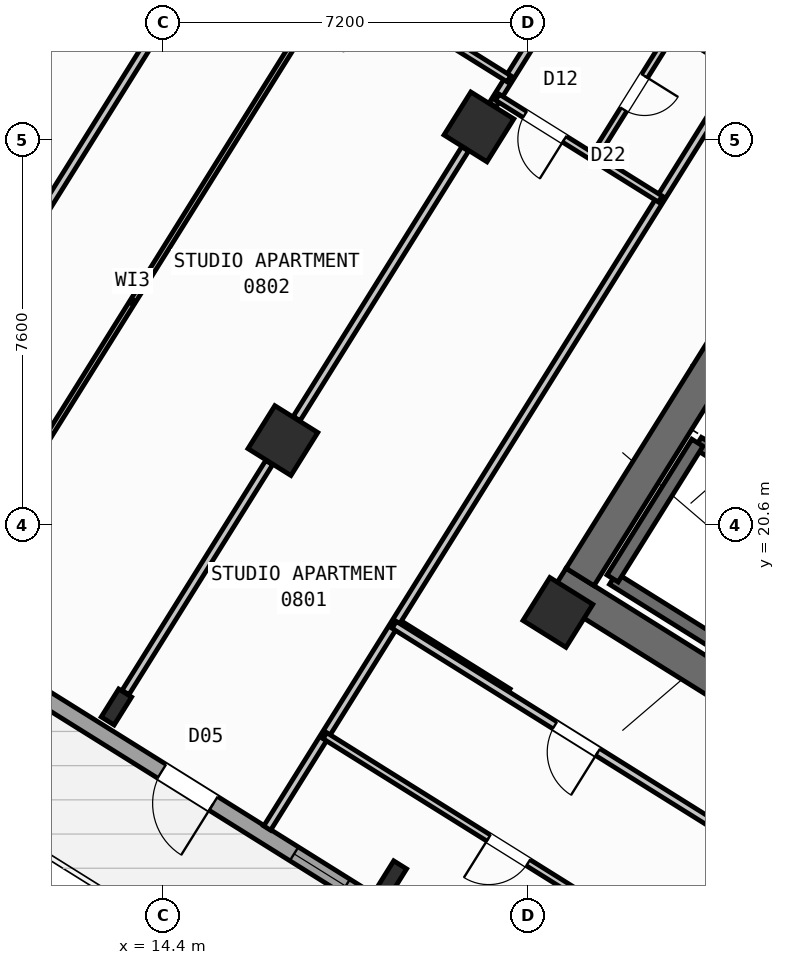
"""IFC4 building model, lengths in metres.
Left out: names, types, materials, properties, quantities, classifications, styles, units other than length and angle.
Written with IfcOpenShell. Run it as: python <this file> out.ifc"""

import sys

from ifc_helpers import new_model, si_unit, direction, frame, frame_2d, origin, origin_2d, place, context, subcontext, project, spatial, rectangle, hollow_rectangle, i_section, extrude, source, transform, mapped, element, fill, save


model = new_model("IFC4")
c1 = context("Model", 3, precision=1e-05, world=origin(), true_north=direction((0.0, 1.0)))
c2 = subcontext(c1, "Body", "Model", "MODEL_VIEW")
j1 = project(units=[si_unit("LENGTHUNIT", "METRE"), si_unit("PLANEANGLEUNIT", "RADIAN")], contexts=[c1])
p1 = place(None, origin())
s1 = spatial("IfcSite", under=j1, at=p1, CompositionType="ELEMENT")
p2 = place(p1, origin())
s2 = spatial("IfcBuilding", under=s1, at=p2, CompositionType="ELEMENT")
p3 = place(p2, frame((0.0, 0.0, 34.8)))
s3 = spatial("IfcBuildingStorey", under=s2, at=p3, CompositionType="ELEMENT", Elevation=34.8)
p4 = place(p3, frame((33.409, 12.45, 0.0), z_axis=(0.0, 0.0, 1.0), x_axis=(-0.848051132073, 0.529914405721, 0.0)))
e1 = element("IfcWall", 1, at=p4, inside=s3, PredefinedType="SHEAR", context=c2, shape_type="SweptSolid", body=[
    extrude(rectangle(XDim=13.24, YDim=0.65, at=frame_2d((6.62, 0.0))), origin(), (0.0, 0.0, 1.0), 3.35),
])
p5 = place(p3, frame((26.007, 24.976, 0.0), z_axis=(0.0, 0.0, 1.0), x_axis=(-0.529916319127, -0.848049936456, 0.0)))
e2 = element("IfcWall", 2, at=p5, inside=s3, PredefinedType="SHEAR", context=c2, shape_type="SweptSolid", body=[
    extrude(rectangle(XDim=6.375, YDim=0.65, at=frame_2d((3.188, 0.0))), origin(), (0.0, 0.0, 1.0), 3.35),
])
m1 = source(origin(), c2, "Body", "SweptSolid", [
    extrude(hollow_rectangle(XDim=1.0, YDim=1.0, WallThickness=0.04, at=origin_2d()), origin(), (0.0, 0.0, 1.0), 3.6),
])
p6 = place(p3, frame((22.191, 18.87, 0.0), z_axis=(0.0, 0.0, 1.0), x_axis=(-0.848048096156, 0.529919264233, 0.0)))
e3 = element("IfcColumn", 3, at=p6, inside=s3, PredefinedType="COLUMN", context=c2, shape_type="MappedRepresentation", body=[
    mapped(m1, transform((0.0, 0.0, 0.0), scale=1.0)),
])
m2 = source(origin(), c2, "Body", "SweptSolid", [
    extrude(i_section(OverallWidth=0.3, OverallDepth=0.65, WebThickness=0.016, FlangeThickness=0.031, at=origin_2d()), origin(), (0.0, 0.0, 1.0), 3.6),
])
p7 = place(p3, frame((18.906, 13.612, 0.0), z_axis=(0.0, 0.0, 1.0), x_axis=(-0.848048096156, 0.529919264233, 0.0)))
e4 = element("IfcColumn", 4, at=p7, inside=s3, PredefinedType="COLUMN", context=c2, shape_type="MappedRepresentation", body=[
    mapped(m2, transform((0.0, 0.0, 0.0), scale=1.0)),
])
for number, where, z_axis, x_axis in (
    (5, (20.632, 28.452, 0.0), (0.0, 0.0, 1.0), (-0.848, 0.53, 0.0)),
    (6, (16.764, 22.261, 0.0), (0.0, 0.0, 1.0), (-0.848, 0.53, 0.0)),
):
    element("IfcColumn", number, at=place(p3, frame(where, z_axis=z_axis, x_axis=x_axis)), inside=s3, PredefinedType="COLUMN", context=c2, shape_type="MappedRepresentation", body=[
        mapped(m1, transform((0.0, 0.0, 0.0), scale=1.0)),
    ])
p8 = place(p3, frame((13.478, 17.003, 0.0), z_axis=(0.0, 0.0, 1.0), x_axis=(-0.848048096156, 0.529919264233, 0.0)))
e7 = element("IfcColumn", 7, at=p8, inside=s3, PredefinedType="COLUMN", context=c2, shape_type="MappedRepresentation", body=[
    mapped(m2, transform((0.0, 0.0, 0.0), scale=1.0)),
])
p9 = place(p3, frame((29.268, 6.429, 0.0), z_axis=(0.0, 0.0, 1.0), x_axis=(-0.848049971435, 0.529916263149, 0.0)))
e8 = element("IfcWall", 8, at=p9, inside=s3, PredefinedType="STANDARD", context=c2, shape_type="SweptSolid", body=[
    extrude(rectangle(XDim=31.588, YDim=0.32, at=frame_2d((15.794, 0.0))), origin(), (0.0, 0.0, 1.0), 3.35),
])
p10 = place(p9, frame((16.362, 0.0, 0.0)))
e9 = element("IfcOpeningElement", 9, at=p10, cuts=e8, PredefinedType="OPENING", context=c2, shape_type="SweptSolid", body=[
    extrude(rectangle(XDim=1.2, YDim=2.15, at=frame_2d((0.6, 1.075))), frame((0.0, 0.17, 0.0), z_axis=(0.0, -1.0, 0.0), x_axis=(1.0, 0.0, 0.0)), (0.0, 0.0, 1.0), 0.34),
])
p11 = place(p9, frame((2.989, 0.0, 0.8)))
e10 = element("IfcOpeningElement", 10, at=p11, cuts=e8, PredefinedType="OPENING", context=c2, shape_type="SweptSolid", body=[
    extrude(rectangle(XDim=2.1, YDim=1.55, at=frame_2d((1.05, 0.775))), frame((0.0, 0.17, 0.0), z_axis=(0.0, -1.0, 0.0), x_axis=(1.0, 0.0, 0.0)), (0.0, 0.0, 1.0), 0.34),
])
p12 = place(p9, frame((8.359, 0.0, 0.8)))
e11 = element("IfcOpeningElement", 11, at=p12, cuts=e8, PredefinedType="OPENING", context=c2, shape_type="SweptSolid", body=[
    extrude(rectangle(XDim=2.1, YDim=1.55, at=frame_2d((1.05, 0.775))), frame((0.0, 0.17, 0.0), z_axis=(0.0, -1.0, 0.0), x_axis=(1.0, 0.0, 0.0)), (0.0, 0.0, 1.0), 0.34),
])
p13 = place(p9, frame((13.284, 0.0, 0.95)))
e12 = element("IfcOpeningElement", 12, at=p13, cuts=e8, PredefinedType="OPENING", context=c2, shape_type="SweptSolid", body=[
    extrude(rectangle(XDim=1.2, YDim=1.4, at=frame_2d((0.6, 0.7))), frame((0.0, 0.17, 0.0), z_axis=(0.0, -1.0, 0.0), x_axis=(1.0, 0.0, 0.0)), (0.0, 0.0, 1.0), 0.34),
])
p14 = place(p9, frame((20.39, 0.0, 0.95)))
e13 = element("IfcOpeningElement", 13, at=p14, cuts=e8, PredefinedType="OPENING", context=c2, shape_type="SweptSolid", body=[
    extrude(rectangle(XDim=1.2, YDim=1.4, at=frame_2d((0.6, 0.7))), frame((0.0, 0.17, 0.0), z_axis=(0.0, -1.0, 0.0), x_axis=(1.0, 0.0, 0.0)), (0.0, 0.0, 1.0), 0.34),
])
p15 = place(p9, frame((23.715, 0.0, 1.0)))
e14 = element("IfcOpeningElement", 14, at=p15, cuts=e8, PredefinedType="OPENING", context=c2, shape_type="SweptSolid", body=[
    extrude(rectangle(XDim=0.9, YDim=1.25, at=frame_2d((0.45, 0.625))), frame((0.0, 0.17, 0.0), z_axis=(0.0, -1.0, 0.0), x_axis=(1.0, 0.0, 0.0)), (0.0, 0.0, 1.0), 0.34),
])
p16 = place(p9, frame((27.481, 0.0, 0.8)))
e15 = element("IfcOpeningElement", 15, at=p16, cuts=e8, PredefinedType="OPENING", context=c2, shape_type="SweptSolid", body=[
    extrude(rectangle(XDim=2.1, YDim=1.55, at=frame_2d((1.05, 0.775))), frame((0.0, 0.17, 0.0), z_axis=(0.0, -1.0, 0.0), x_axis=(1.0, 0.0, 0.0)), (0.0, 0.0, 1.0), 0.34),
])
p17 = place(p3, frame((2.415, 23.452, 0.0), z_axis=(0.0, 0.0, 1.0), x_axis=(0.52991049553, 0.848053575387, 0.0)))
e16 = element("IfcWall", 16, at=p17, inside=s3, PredefinedType="STANDARD", context=c2, shape_type="SweptSolid", body=[
    extrude(rectangle(XDim=21.587, YDim=0.32, at=frame_2d((10.794, 0.0))), origin(), (0.0, 0.0, 1.0), 2.725),
])
p18 = place(p17, frame((2.356, 0.0, 0.8)))
e17 = element("IfcOpeningElement", 17, at=p18, cuts=e16, PredefinedType="OPENING", context=c2, shape_type="SweptSolid", body=[
    extrude(rectangle(XDim=2.1, YDim=1.55, at=frame_2d((1.05, 0.775))), frame((0.0, 0.17, 0.0), z_axis=(0.0, -1.0, 0.0), x_axis=(1.0, 0.0, 0.0)), (0.0, 0.0, 1.0), 0.34),
])
p19 = place(p17, frame((9.344, 0.0, 0.85)))
e18 = element("IfcOpeningElement", 18, at=p19, cuts=e16, PredefinedType="OPENING", context=c2, shape_type="SweptSolid", body=[
    extrude(rectangle(XDim=1.8, YDim=1.5, at=frame_2d((0.9, 0.75))), frame((0.0, 0.17, 0.0), z_axis=(0.0, -1.0, 0.0), x_axis=(1.0, 0.0, 0.0)), (0.0, 0.0, 1.0), 0.34),
])
p20 = place(p17, frame((15.154, 0.0, 0.85)))
e19 = element("IfcOpeningElement", 19, at=p20, cuts=e16, PredefinedType="OPENING", context=c2, shape_type="SweptSolid", body=[
    extrude(rectangle(XDim=1.5, YDim=1.5, at=frame_2d((0.75, 0.75))), frame((0.0, 0.17, 0.0), z_axis=(0.0, -1.0, 0.0), x_axis=(1.0, 0.0, 0.0)), (0.0, 0.0, 1.0), 0.34),
])
p21 = place(p3, frame((14.138, 41.825, 0.0), z_axis=(0.0, 0.0, 1.0), x_axis=(0.848046498049, -0.529921821731, 0.0)))
e20 = element("IfcWall", 20, at=p21, inside=s3, PredefinedType="STANDARD", context=c2, shape_type="SweptSolid", body=[
    extrude(rectangle(XDim=31.588, YDim=0.32, at=frame_2d((15.794, 0.0))), origin(), (0.0, 0.0, 1.0), 3.35),
])
p22 = place(p21, frame((3.369, 0.0, 0.0)))
e21 = element("IfcOpeningElement", 21, at=p22, cuts=e20, PredefinedType="OPENING", context=c2, shape_type="SweptSolid", body=[
    extrude(rectangle(XDim=1.05, YDim=2.15, at=frame_2d((0.525, 1.075))), frame((0.0, 0.17, 0.0), z_axis=(0.0, -1.0, 0.0), x_axis=(1.0, 0.0, 0.0)), (0.0, 0.0, 1.0), 0.34),
])
p23 = place(p21, frame((0.946, 0.0, 0.85)))
e22 = element("IfcOpeningElement", 22, at=p23, cuts=e20, PredefinedType="OPENING", context=c2, shape_type="SweptSolid", body=[
    extrude(rectangle(XDim=1.8, YDim=1.5, at=frame_2d((0.9, 0.75))), frame((0.0, 0.17, 0.0), z_axis=(0.0, -1.0, 0.0), x_axis=(1.0, 0.0, 0.0)), (0.0, 0.0, 1.0), 0.34),
])
p24 = place(p21, frame((8.46, 0.0, 0.85)))
e23 = element("IfcOpeningElement", 23, at=p24, cuts=e20, PredefinedType="OPENING", context=c2, shape_type="SweptSolid", body=[
    extrude(rectangle(XDim=1.8, YDim=1.5, at=frame_2d((0.9, 0.75))), frame((0.0, 0.17, 0.0), z_axis=(0.0, -1.0, 0.0), x_axis=(1.0, 0.0, 0.0)), (0.0, 0.0, 1.0), 0.34),
])
p25 = place(p21, frame((13.899, 0.0, 0.85)))
e24 = element("IfcOpeningElement", 24, at=p25, cuts=e20, PredefinedType="OPENING", context=c2, shape_type="SweptSolid", body=[
    extrude(rectangle(XDim=1.5, YDim=1.5, at=frame_2d((0.75, 0.75))), frame((0.0, 0.17, 0.0), z_axis=(0.0, -1.0, 0.0), x_axis=(1.0, 0.0, 0.0)), (0.0, 0.0, 1.0), 0.34),
])
p26 = place(p21, frame((22.019, 0.0, 0.95)))
e25 = element("IfcOpeningElement", 25, at=p26, cuts=e20, PredefinedType="OPENING", context=c2, shape_type="SweptSolid", body=[
    extrude(rectangle(XDim=1.2, YDim=1.4, at=frame_2d((0.6, 0.7))), frame((0.0, 0.17, 0.0), z_axis=(0.0, -1.0, 0.0), x_axis=(1.0, 0.0, 0.0)), (0.0, 0.0, 1.0), 0.34),
])
p27 = place(p21, frame((27.569, 0.0, 0.95)))
e26 = element("IfcOpeningElement", 26, at=p27, cuts=e20, PredefinedType="OPENING", context=c2, shape_type="SweptSolid", body=[
    extrude(rectangle(XDim=1.2, YDim=1.4, at=frame_2d((0.6, 0.7))), frame((0.0, 0.17, 0.0), z_axis=(0.0, -1.0, 0.0), x_axis=(1.0, 0.0, 0.0)), (0.0, 0.0, 1.0), 0.34),
])
p28 = place(p3, frame((29.605, 15.581, 0.0), z_axis=(0.0, 0.0, 1.0), x_axis=(-0.848036911448, 0.529937163087, 0.0)))
e27 = element("IfcWall", 27, at=p28, inside=s3, PredefinedType="SHEAR", context=c2, shape_type="SweptSolid", body=[
    extrude(rectangle(XDim=7.46, YDim=0.26, at=frame_2d((3.73, 0.0))), origin(), (0.0, 0.0, 1.0), 3.35),
])
p29 = place(p3, frame((31.28, 18.261, 0.0), z_axis=(0.0, 0.0, 1.0), x_axis=(-0.848051618787, 0.529913626805, 0.0)))
e28 = element("IfcWall", 28, at=p29, inside=s3, PredefinedType="SHEAR", context=c2, shape_type="SweptSolid", body=[
    extrude(rectangle(XDim=7.46, YDim=0.26, at=frame_2d((3.73, 0.0))), origin(), (0.0, 0.0, 1.0), 3.35),
])
p30 = place(p29, frame((0.36, 0.0, 0.0)))
e29 = element("IfcOpeningElement", 29, at=p30, cuts=e28, PredefinedType="OPENING", context=c2, shape_type="SweptSolid", body=[
    extrude(rectangle(XDim=0.86, YDim=2.05, at=frame_2d((0.43, 1.025))), frame((0.0, 0.14, 0.0), z_axis=(0.0, -1.0, 0.0), x_axis=(1.0, 0.0, 0.0)), (0.0, 0.0, 1.0), 0.28),
])
p31 = place(p3, frame((24.945, 22.22, 0.0), z_axis=(0.0, 0.0, 1.0), x_axis=(-0.529908658664, -0.84805472316, 0.0)))
e30 = element("IfcWall", 30, at=p31, inside=s3, PredefinedType="SHEAR", context=c2, shape_type="SweptSolid", body=[
    extrude(rectangle(XDim=3.16, YDim=0.26, at=frame_2d((1.58, 0.0))), origin(), (0.0, 0.0, 1.0), 3.35),
])
p32 = place(p3, frame((21.206, 17.292, 0.0), z_axis=(0.0, 0.0, 1.0), x_axis=(-0.848050851465, 0.529914854792, 0.0)))
e31 = element("IfcWall", 31, at=p32, inside=s3, PredefinedType="PARTITIONING", context=c2, shape_type="SweptSolid", body=[
    extrude(rectangle(XDim=2.61, YDim=0.16, at=frame_2d((1.305, 0.0))), origin(), (0.0, 0.0, 1.0), 3.34),
])
p33 = place(p3, frame((25.807, 29.582, 0.0), z_axis=(0.0, 0.0, 1.0), x_axis=(-0.529918119251, -0.84804881162, 0.0)))
e32 = element("IfcWall", 32, at=p33, inside=s3, PredefinedType="PARTITIONING", context=c2, shape_type="SweptSolid", body=[
    extrude(rectangle(XDim=17.65, YDim=0.16, at=frame_2d((8.825, 0.0))), origin(), (0.0, 0.0, 1.0), 3.34),
])
p34 = place(p3, frame((25.807, 29.582, 0.0), z_axis=(0.0, 0.0, 1.0), x_axis=(-0.848052408131, 0.529912363569, 0.0)))
e33 = element("IfcWall", 33, at=p34, inside=s3, PredefinedType="PARTITIONING", context=c2, shape_type="SweptSolid", body=[
    extrude(rectangle(XDim=16.73, YDim=0.16, at=frame_2d((8.365, 0.0))), origin(), (0.0, 0.0, 1.0), 3.34),
])
p35 = place(p34, frame((2.22, 0.0, 0.0)))
e34 = element("IfcOpeningElement", 34, at=p35, cuts=e33, PredefinedType="OPENING", context=c2, shape_type="SweptSolid", body=[
    extrude(rectangle(XDim=0.86, YDim=2.05, at=frame_2d((0.43, 1.025))), frame((0.0, 0.09, 0.0), z_axis=(0.0, -1.0, 0.0), x_axis=(1.0, 0.0, 0.0)), (0.0, 0.0, 1.0), 0.18),
])
p36 = place(p34, frame((7.82, 0.0, 0.0)))
e35 = element("IfcOpeningElement", 35, at=p36, cuts=e33, PredefinedType="OPENING", context=c2, shape_type="SweptSolid", body=[
    extrude(rectangle(XDim=1.0, YDim=2.1, at=frame_2d((0.5, 1.05))), frame((0.0, 0.09, 0.0), z_axis=(0.0, -1.0, 0.0), x_axis=(1.0, 0.0, 0.0)), (0.0, 0.0, 1.0), 0.18),
])
p37 = place(p34, frame((12.95, 0.0, 0.0)))
e36 = element("IfcOpeningElement", 36, at=p37, cuts=e33, PredefinedType="OPENING", context=c2, shape_type="SweptSolid", body=[
    extrude(rectangle(XDim=1.0, YDim=2.1, at=frame_2d((0.5, 1.05))), frame((0.0, 0.09, 0.0), z_axis=(0.0, -1.0, 0.0), x_axis=(1.0, 0.0, 0.0)), (0.0, 0.0, 1.0), 0.18),
])
p38 = place(p3, frame((22.593, 31.59, 0.0), z_axis=(0.0, 0.0, 1.0), x_axis=(-0.529930102756, -0.848041323399, 0.0)))
e37 = element("IfcWall", 37, at=p38, inside=s3, PredefinedType="PARTITIONING", context=c2, shape_type="SweptSolid", body=[
    extrude(rectangle(XDim=3.188, YDim=0.16, at=frame_2d((1.594, 0.0))), origin(), (0.0, 0.0, 1.0), 2.725),
])
p39 = place(p3, frame((20.361, 28.018, 0.0), z_axis=(0.0, 0.0, 1.0), x_axis=(-0.529915015264, -0.848050751193, 0.0)))
e38 = element("IfcWall", 38, at=p39, inside=s3, PredefinedType="PARTITIONING", context=c2, shape_type="SweptSolid", body=[
    extrude(rectangle(XDim=6.276, YDim=0.16, at=frame_2d((3.138, 0.0))), origin(), (0.0, 0.0, 1.0), 2.725),
])
p40 = place(p3, frame((16.492, 21.827, 0.0), z_axis=(0.0, 0.0, 1.0), x_axis=(-0.529904608059, -0.848057254175, 0.0)))
e39 = element("IfcWall", 39, at=p40, inside=s3, PredefinedType="PARTITIONING", context=c2, shape_type="SweptSolid", body=[
    extrude(rectangle(XDim=5.351, YDim=0.16, at=frame_2d((2.675, 0.0))), origin(), (0.0, 0.0, 1.0), 2.725),
])
p41 = place(p3, frame((24.212, 27.029, 0.0), z_axis=(0.0, 0.0, 1.0), x_axis=(-0.84803087207, 0.529946827537, 0.0)))
e40 = element("IfcWall", 40, at=p41, inside=s3, PredefinedType="PLUMBINGWALL", context=c2, shape_type="SweptSolid", body=[
    extrude(rectangle(XDim=3.79, YDim=0.14, at=frame_2d((1.895, 0.0))), origin(), (0.0, 0.0, 1.0), 3.34),
])
p42 = place(p41, frame((2.23, 0.0, 0.0)))
e41 = element("IfcOpeningElement", 41, at=p42, cuts=e40, PredefinedType="OPENING", context=c2, shape_type="SweptSolid", body=[
    extrude(rectangle(XDim=0.92, YDim=2.08, at=frame_2d((0.46, 1.04))), frame((0.0, 0.08, 0.0), z_axis=(0.0, -1.0, 0.0), x_axis=(1.0, 0.0, 0.0)), (0.0, 0.0, 1.0), 0.16),
])
p43 = place(p3, frame((24.492, 30.403, 0.0), z_axis=(0.0, 0.0, 1.0), x_axis=(-0.529977067289, -0.848011974059, 0.0)))
e42 = element("IfcWall", 42, at=p43, inside=s3, PredefinedType="PLUMBINGWALL", context=c2, shape_type="SweptSolid", body=[
    extrude(rectangle(XDim=3.01, YDim=0.14, at=frame_2d((1.505, 0.0))), origin(), (0.0, 0.0, 1.0), 2.995),
])
p44 = place(p43, frame((1.115, 0.0, 0.0)))
e43 = element("IfcOpeningElement", 43, at=p44, cuts=e42, PredefinedType="OPENING", context=c2, shape_type="SweptSolid", body=[
    extrude(rectangle(XDim=0.78, YDim=2.05, at=frame_2d((0.39, 1.025))), frame((0.0, 0.08, 0.0), z_axis=(0.0, -1.0, 0.0), x_axis=(1.0, 0.0, 0.0)), (0.0, 0.0, 1.0), 0.16),
])
p45 = place(p3, frame((14.933, 31.409, 0.0), z_axis=(0.0, 0.0, 1.0), x_axis=(-0.529897533635, -0.848061674554, 0.0)))
e44 = element("IfcWall", 44, at=p45, inside=s3, PredefinedType="PARTITIONING", context=c2, shape_type="SweptSolid", body=[
    extrude(rectangle(XDim=6.276, YDim=0.16, at=frame_2d((3.138, 0.0))), origin(), (0.0, 0.0, 1.0), 2.725),
])
p46 = place(p3, frame((21.226, 29.402, 0.0), z_axis=(0.0, 0.0, 1.0), x_axis=(-0.848039019877, 0.529933789039, 0.0)))
e45 = element("IfcWall", 45, at=p46, inside=s3, PredefinedType="PLUMBINGWALL", context=c2, shape_type="SweptSolid", body=[
    extrude(rectangle(XDim=6.4, YDim=0.14, at=frame_2d((3.2, 0.0))), origin(), (0.0, 0.0, 1.0), 3.34),
])
p47 = place(p46, frame((2.824, 0.0, 0.0)))
e46 = element("IfcOpeningElement", 46, at=p47, cuts=e45, PredefinedType="OPENING", context=c2, shape_type="SweptSolid", body=[
    extrude(rectangle(XDim=0.78, YDim=2.05, at=frame_2d((0.39, 1.025))), frame((0.0, 0.08, 0.0), z_axis=(0.0, -1.0, 0.0), x_axis=(1.0, 0.0, 0.0)), (0.0, 0.0, 1.0), 0.16),
])
p48 = place(p3, frame((17.861, 31.505, 0.0), z_axis=(0.0, 0.0, 1.0), x_axis=(-0.529928839727, -0.848042112649, 0.0)))
e47 = element("IfcWall", 47, at=p48, inside=s3, PredefinedType="PARTITIONING", context=c2, shape_type="SweptSolid", body=[
    extrude(rectangle(XDim=15.34, YDim=0.11, at=frame_2d((7.67, 0.0))), origin(), (0.0, 0.0, 1.0), 3.34),
])
p49 = place(p48, frame((0.35, 0.0, 0.0)))
e48 = element("IfcOpeningElement", 48, at=p49, cuts=e47, PredefinedType="OPENING", context=c2, shape_type="SweptSolid", body=[
    extrude(rectangle(XDim=0.92, YDim=2.08, at=frame_2d((0.46, 1.04))), frame((0.0, 0.065, 0.0), z_axis=(0.0, -1.0, 0.0), x_axis=(1.0, 0.0, 0.0)), (0.0, 0.0, 1.0), 0.13),
])
p50 = place(p3, frame((32.164, 10.374, 0.0), z_axis=(0.0, 0.0, 1.0), x_axis=(-0.848044107957, 0.529925646633, 0.0)))
e49 = element("IfcWall", 49, at=p50, inside=s3, PredefinedType="PARTITIONING", context=c2, shape_type="SweptSolid", body=[
    extrude(rectangle(XDim=15.57, YDim=0.16, at=frame_2d((7.785, 0.0))), origin(), (0.0, 0.0, 1.0), 3.34),
])
p51 = place(p50, frame((10.83, 0.0, 0.0)))
e50 = element("IfcOpeningElement", 50, at=p51, cuts=e49, PredefinedType="OPENING", context=c2, shape_type="SweptSolid", body=[
    extrude(rectangle(XDim=1.0, YDim=2.1, at=frame_2d((0.5, 1.05))), frame((0.0, 0.09, 0.0), z_axis=(0.0, -1.0, 0.0), x_axis=(1.0, 0.0, 0.0)), (0.0, 0.0, 1.0), 0.18),
])
p52 = place(p3, frame((29.72, 8.859, 0.0), z_axis=(0.0, 0.0, 1.0), x_axis=(-0.848049134363, 0.529917602752, 0.0)))
e51 = element("IfcWall", 51, at=p52, inside=s3, PredefinedType="PLUMBINGWALL", context=c2, shape_type="SweptSolid", body=[
    extrude(rectangle(XDim=14.3, YDim=0.14, at=frame_2d((7.15, 0.0))), origin(), (0.0, 0.0, 1.0), 3.34),
])
p53 = place(p52, frame((9.57, 0.0, 0.0)))
e52 = element("IfcOpeningElement", 52, at=p53, cuts=e51, PredefinedType="OPENING", context=c2, shape_type="SweptSolid", body=[
    extrude(rectangle(XDim=0.92, YDim=2.08, at=frame_2d((0.46, 1.04))), frame((0.0, 0.08, 0.0), z_axis=(0.0, -1.0, 0.0), x_axis=(1.0, 0.0, 0.0)), (0.0, 0.0, 1.0), 0.16),
])
p54 = place(p3, frame((26.237, 14.078, 0.0), z_axis=(0.0, 0.0, 1.0), x_axis=(-0.52995640672, -0.848024885824, 0.0)))
e53 = element("IfcWall", 53, at=p54, inside=s3, PredefinedType="PLUMBINGWALL", context=c2, shape_type="SweptSolid", body=[
    extrude(rectangle(XDim=2.58, YDim=0.14, at=frame_2d((1.29, 0.0))), origin(), (0.0, 0.0, 1.0), 3.34),
])
p55 = place(p54, frame((0.9, 0.0, 0.0)))
e54 = element("IfcOpeningElement", 54, at=p55, cuts=e53, PredefinedType="OPENING", context=c2, shape_type="SweptSolid", body=[
    extrude(rectangle(XDim=0.78, YDim=2.05, at=frame_2d((0.39, 1.025))), frame((0.0, 0.08, 0.0), z_axis=(0.0, -1.0, 0.0), x_axis=(1.0, 0.0, 0.0)), (0.0, 0.0, 1.0), 0.16),
])
m3 = source(origin(), c2, "Body", "SweptSolid", [
    extrude(rectangle(XDim=1.2, YDim=2.15, at=frame_2d((0.6, 1.075))), frame((0.0, 0.025, 0.0), z_axis=(0.0, -1.0, 0.0), x_axis=(1.0, 0.0, 0.0)), (0.0, 0.0, 1.0), 0.05),
])
p56 = place(p10, origin())
e55 = element("IfcDoor", 55, at=p56, inside=s3, OperationType="SINGLE_SWING_LEFT", PredefinedType="DOOR", context=c2, shape_type="MappedRepresentation", body=[
    mapped(m3, transform((0.0, 0.0, 0.0), scale=1.0)),
])
fill(e9, e55)
m4 = source(origin(), c2, "Body", "SweptSolid", [
    extrude(rectangle(XDim=1.2, YDim=1.4, at=frame_2d((0.6, 0.7))), frame((0.0, 0.03, 0.0), z_axis=(0.0, -1.0, 0.0), x_axis=(1.0, 0.0, 0.0)), (0.0, 0.0, 1.0), 0.06),
])
p57 = place(p13, origin())
e56 = element("IfcWindow", 56, at=p57, inside=s3, PartitioningType="SINGLE_PANEL", PredefinedType="WINDOW", context=c2, shape_type="MappedRepresentation", body=[
    mapped(m4, transform((0.0, 0.0, 0.0), scale=1.0)),
])
fill(e12, e56)
m5 = source(origin(), c2, "Body", "SweptSolid", [
    extrude(rectangle(XDim=0.92, YDim=2.08, at=frame_2d((0.46, 1.04))), frame((0.0, 0.025, 0.0), z_axis=(0.0, -1.0, 0.0), x_axis=(1.0, 0.0, 0.0)), (0.0, 0.0, 1.0), 0.05),
])
p58 = place(p42, origin())
e57 = element("IfcDoor", 57, at=p58, inside=s3, OperationType="SINGLE_SWING_LEFT", PredefinedType="DOOR", context=c2, shape_type="MappedRepresentation", body=[
    mapped(m5, transform((0.0, 0.0, 0.0), scale=1.0)),
])
fill(e41, e57)
m6 = source(origin(), c2, "Body", "SweptSolid", [
    extrude(rectangle(XDim=0.78, YDim=2.05, at=frame_2d((0.39, 1.025))), frame((0.0, 0.025, 0.0), z_axis=(0.0, -1.0, 0.0), x_axis=(1.0, 0.0, 0.0)), (0.0, 0.0, 1.0), 0.05),
])
p59 = place(p44, origin())
e58 = element("IfcDoor", 58, at=p59, inside=s3, OperationType="SINGLE_SWING_LEFT", PredefinedType="DOOR", context=c2, shape_type="MappedRepresentation", body=[
    mapped(m6, transform((0.0, 0.0, 0.0), scale=1.0)),
])
fill(e43, e58)
m7 = source(origin(), c2, "Body", "SweptSolid", [
    extrude(rectangle(XDim=1.0, YDim=2.1, at=frame_2d((0.5, 1.05))), frame((0.0, 0.025, 0.0), z_axis=(0.0, -1.0, 0.0), x_axis=(1.0, 0.0, 0.0)), (0.0, 0.0, 1.0), 0.05),
])
p60 = place(p51, origin())
e59 = element("IfcDoor", 59, at=p60, inside=s3, OperationType="SINGLE_SWING_LEFT", PredefinedType="DOOR", context=c2, shape_type="MappedRepresentation", body=[
    mapped(m7, transform((0.0, 0.0, 0.0), scale=1.0)),
])
fill(e50, e59)
p61 = place(p53, origin())
e60 = element("IfcDoor", 60, at=p61, inside=s3, OperationType="SINGLE_SWING_RIGHT", PredefinedType="DOOR", context=c2, shape_type="MappedRepresentation", body=[
    mapped(m5, transform((0.0, 0.0, 0.0), scale=1.0)),
])
fill(e52, e60)
save(model, sys.argv[1])
